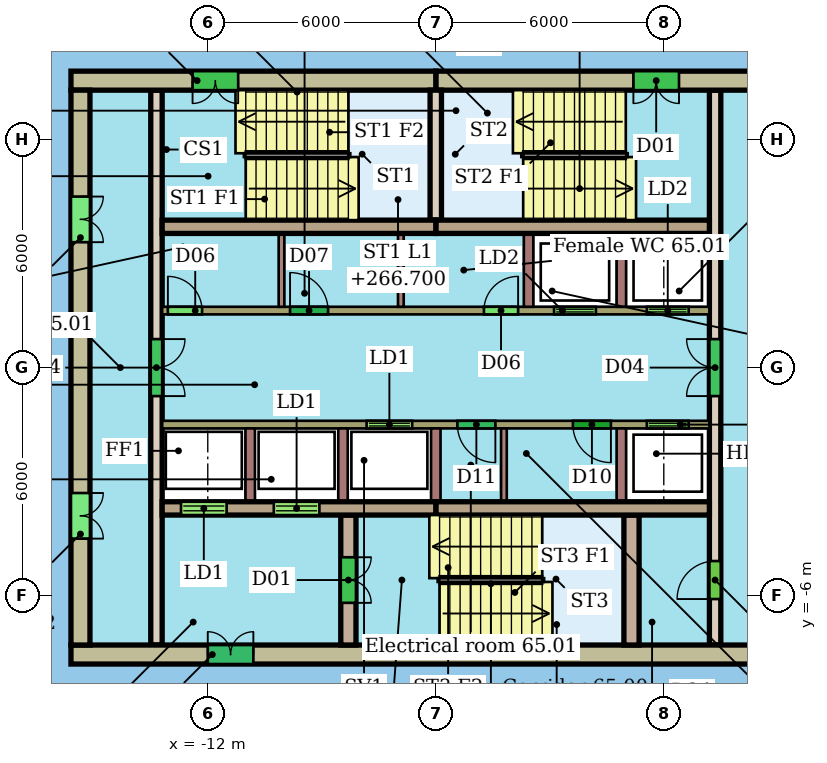
"""IFC4 building model, lengths in metres.
Left out: names, types, materials, properties, quantities, classifications, styles, units other than length and angle.
Written with IfcOpenShell. Run it as: python <this file> out.ifc"""

import sys

from ifc_helpers import new_model, si_unit, direction, frame, frame_2d, origin, place, context, subcontext, project, spatial, rectangle, extrude, element, fill, save


model = new_model("IFC4")
c1 = context("Model", 3, precision=1e-05, world=origin(), true_north=direction((0.0, 1.0)))
c2 = subcontext(c1, "Body", "Model", "MODEL_VIEW")
j1 = project(units=[si_unit("LENGTHUNIT", "METRE"), si_unit("PLANEANGLEUNIT", "RADIAN")], contexts=[c1])
p1 = place(None, origin())
s1 = spatial("IfcSite", under=j1, at=p1, CompositionType="ELEMENT")
p2 = place(p1, origin())
s2 = spatial("IfcBuilding", under=s1, at=p2, CompositionType="ELEMENT")
p3 = place(p2, frame((0.0, 0.0, 264.9)))
s3 = spatial("IfcBuildingStorey", under=s2, at=p3, CompositionType="ELEMENT", Elevation=264.9)
p4 = place(p3, frame((3.6, 7.55, 0.0), z_axis=(0.0, 0.0, 1.0), x_axis=(-1.0, 0.0, 0.0)))
e1 = element("IfcWall", 1, at=p4, inside=s3, PredefinedType="SHEAR", context=c2, shape_type="SweptSolid", body=[
    extrude(rectangle(XDim=9.6, YDim=0.5, at=frame_2d((4.8, 0.0))), origin(), (0.0, 0.0, 1.0), 3.3),
])
p5 = place(p4, frame((3.2, 0.0, 0.0)))
e2 = element("IfcOpeningElement", 2, at=p5, cuts=e1, PredefinedType="OPENING", context=c2, shape_type="SweptSolid", body=[
    extrude(rectangle(XDim=1.2, YDim=2.1, at=frame_2d((0.6, 1.05))), frame((0.0, 0.26, 0.0), z_axis=(0.0, -1.0, 0.0), x_axis=(1.0, 0.0, 0.0)), (0.0, 0.0, 1.0), 0.52),
])
p6 = place(p3, frame((-6.0, 7.55, 0.0), z_axis=(0.0, 0.0, 1.0), x_axis=(-1.0, 0.0, 0.0)))
e3 = element("IfcWall", 3, at=p6, inside=s3, PredefinedType="SHEAR", context=c2, shape_type="SweptSolid", body=[
    extrude(rectangle(XDim=9.6, YDim=0.5, at=frame_2d((4.8, 0.0))), origin(), (0.0, 0.0, 1.0), 3.3),
])
p7 = place(p6, frame((5.2, 0.0, 0.0)))
e4 = element("IfcOpeningElement", 4, at=p7, cuts=e3, PredefinedType="OPENING", context=c2, shape_type="SweptSolid", body=[
    extrude(rectangle(XDim=1.2, YDim=2.1, at=frame_2d((0.6, 1.05))), frame((0.0, 0.26, 0.0), z_axis=(0.0, -1.0, 0.0), x_axis=(1.0, 0.0, 0.0)), (0.0, 0.0, 1.0), 0.52),
])
p8 = place(p3, frame((-15.6, -7.55, 0.0), z_axis=(0.0, 0.0, 1.0), x_axis=(1.0, 0.0, 0.0)))
e5 = element("IfcWall", 5, at=p8, inside=s3, PredefinedType="SHEAR", context=c2, shape_type="SweptSolid", body=[
    extrude(rectangle(XDim=19.2, YDim=0.5, at=frame_2d((9.6, 0.0))), origin(), (0.0, 0.0, 1.0), 3.3),
])
p9 = place(p8, frame((3.6, 0.0, 0.0)))
e6 = element("IfcOpeningElement", 6, at=p9, cuts=e5, PredefinedType="OPENING", context=c2, shape_type="SweptSolid", body=[
    extrude(rectangle(XDim=1.2, YDim=2.1, at=frame_2d((0.6, 1.05))), frame((0.0, 0.26, 0.0), z_axis=(0.0, -1.0, 0.0), x_axis=(1.0, 0.0, 0.0)), (0.0, 0.0, 1.0), 0.52),
])
p10 = place(p3, frame((-15.35, 7.3, 0.0), z_axis=(0.0, 0.0, 1.0), x_axis=(0.0, -1.0, 0.0)))
e7 = element("IfcWall", 7, at=p10, inside=s3, PredefinedType="SHEAR", context=c2, shape_type="SweptSolid", body=[
    extrude(rectangle(XDim=14.6, YDim=0.5, at=frame_2d((7.3, 0.0))), origin(), (0.0, 0.0, 1.0), 3.3),
])
p11 = place(p10, frame((10.6, 0.0, 0.0)))
e8 = element("IfcOpeningElement", 8, at=p11, cuts=e7, PredefinedType="OPENING", context=c2, shape_type="SweptSolid", body=[
    extrude(rectangle(XDim=1.2, YDim=2.1, at=frame_2d((0.6, 1.05))), frame((0.0, 0.26, 0.0), z_axis=(0.0, -1.0, 0.0), x_axis=(1.0, 0.0, 0.0)), (0.0, 0.0, 1.0), 0.52),
])
p12 = place(p10, frame((2.8, 0.0, 0.0)))
e9 = element("IfcOpeningElement", 9, at=p12, cuts=e7, PredefinedType="OPENING", context=c2, shape_type="SweptSolid", body=[
    extrude(rectangle(XDim=1.2, YDim=2.1, at=frame_2d((0.6, 1.05))), frame((0.0, 0.26, 0.0), z_axis=(0.0, -1.0, 0.0), x_axis=(1.0, 0.0, 0.0)), (0.0, 0.0, 1.0), 0.52),
])
for number, where, z_axis, x_axis in (
    (10, (-13.2, 3.705, 0.0), (0.0, 0.0, 1.0), (1.0, 0.0, 0.0)),
    (11, (-6.0, 3.705, 0.0), (0.0, 0.0, 1.0), (1.0, 0.0, 0.0)),
):
    element("IfcWall", number, at=place(p3, frame(where, z_axis=z_axis, x_axis=x_axis)), inside=s3, PredefinedType="SHEAR", context=c2, shape_type="SweptSolid", body=[
        extrude(rectangle(XDim=7.2, YDim=0.35, at=frame_2d((3.6, 0.0))), origin(), (0.0, 0.0, 1.0), 3.3),
    ])
p13 = place(p3, frame((-13.2, -3.705, 0.0), z_axis=(0.0, 0.0, 1.0), x_axis=(1.0, 0.0, 0.0)))
e12 = element("IfcWall", 12, at=p13, inside=s3, PredefinedType="SHEAR", context=c2, shape_type="SweptSolid", body=[
    extrude(rectangle(XDim=7.2, YDim=0.35, at=frame_2d((3.6, 0.0))), origin(), (0.0, 0.0, 1.0), 3.3),
])
p14 = place(p13, frame((0.496, 0.0, 0.0)))
e13 = element("IfcOpeningElement", 13, at=p14, cuts=e12, PredefinedType="OPENING", context=c2, shape_type="SweptSolid", body=[
    extrude(rectangle(XDim=1.2, YDim=2.1, at=frame_2d((0.6, 1.05))), frame((0.0, 0.185, 0.0), z_axis=(0.0, -1.0, 0.0), x_axis=(1.0, 0.0, 0.0)), (0.0, 0.0, 1.0), 0.37),
])
p15 = place(p13, frame((2.938, 0.0, 0.0)))
e14 = element("IfcOpeningElement", 14, at=p15, cuts=e12, PredefinedType="OPENING", context=c2, shape_type="SweptSolid", body=[
    extrude(rectangle(XDim=1.2, YDim=2.1, at=frame_2d((0.6, 1.05))), frame((0.0, 0.185, 0.0), z_axis=(0.0, -1.0, 0.0), x_axis=(1.0, 0.0, 0.0)), (0.0, 0.0, 1.0), 0.37),
])
p16 = place(p3, frame((-6.0, -3.705, 0.0), z_axis=(0.0, 0.0, 1.0), x_axis=(1.0, 0.0, 0.0)))
e15 = element("IfcWall", 15, at=p16, inside=s3, PredefinedType="SHEAR", context=c2, shape_type="SweptSolid", body=[
    extrude(rectangle(XDim=7.2, YDim=0.35, at=frame_2d((3.6, 0.0))), origin(), (0.0, 0.0, 1.0), 3.3),
])
p17 = place(p3, frame((-13.35, 7.3, 0.0), z_axis=(0.0, 0.0, 1.0), x_axis=(0.0, -1.0, 0.0)))
e16 = element("IfcWall", 16, at=p17, inside=s3, PredefinedType="SHEAR", context=c2, shape_type="SweptSolid", body=[
    extrude(rectangle(XDim=14.6, YDim=0.3, at=frame_2d((7.3, 0.0))), origin(), (0.0, 0.0, 1.0), 3.3),
])
p18 = place(p17, frame((6.55, 0.0, 0.0)))
e17 = element("IfcOpeningElement", 17, at=p18, cuts=e16, PredefinedType="OPENING", context=c2, shape_type="SweptSolid", body=[
    extrude(rectangle(XDim=1.5, YDim=2.1, at=frame_2d((0.75, 1.05))), frame((0.0, 0.16, 0.0), z_axis=(0.0, -1.0, 0.0), x_axis=(1.0, 0.0, 0.0)), (0.0, 0.0, 1.0), 0.32),
])
p19 = place(p3, frame((1.35, -7.3, 0.0), z_axis=(0.0, 0.0, 1.0), x_axis=(0.0, 1.0, 0.0)))
e18 = element("IfcWall", 18, at=p19, inside=s3, PredefinedType="SHEAR", context=c2, shape_type="SweptSolid", body=[
    extrude(rectangle(XDim=14.6, YDim=0.3, at=frame_2d((7.3, 0.0))), origin(), (0.0, 0.0, 1.0), 3.3),
])
p20 = place(p19, frame((1.21, 0.0, 0.0)))
e19 = element("IfcOpeningElement", 19, at=p20, cuts=e18, PredefinedType="OPENING", context=c2, shape_type="SweptSolid", body=[
    extrude(rectangle(XDim=1.0, YDim=2.1, at=frame_2d((0.5, 1.05))), frame((0.0, 0.16, 0.0), z_axis=(0.0, -1.0, 0.0), x_axis=(1.0, 0.0, 0.0)), (0.0, 0.0, 1.0), 0.32),
])
p21 = place(p19, frame((6.55, 0.0, 0.0)))
e20 = element("IfcOpeningElement", 20, at=p21, cuts=e18, PredefinedType="OPENING", context=c2, shape_type="SweptSolid", body=[
    extrude(rectangle(XDim=1.5, YDim=2.1, at=frame_2d((0.75, 1.05))), frame((0.0, 0.16, 0.0), z_axis=(0.0, -1.0, 0.0), x_axis=(1.0, 0.0, 0.0)), (0.0, 0.0, 1.0), 0.32),
])
p22 = place(p3, frame((-13.2, 1.5, 0.0), z_axis=(0.0, 0.0, 1.0), x_axis=(1.0, 0.0, 0.0)))
e21 = element("IfcWall", 21, at=p22, inside=s3, PredefinedType="SHEAR", context=c2, shape_type="SweptSolid", body=[
    extrude(rectangle(XDim=14.4, YDim=0.2, at=frame_2d((7.2, 0.0))), origin(), (0.0, 0.0, 1.0), 3.3),
])
p23 = place(p22, frame((10.312, 0.0, 0.0)))
e22 = element("IfcOpeningElement", 22, at=p23, cuts=e21, PredefinedType="OPENING", context=c2, shape_type="SweptSolid", body=[
    extrude(rectangle(XDim=1.1, YDim=2.1, at=frame_2d((0.55, 1.05))), frame((0.0, 0.11, 0.0), z_axis=(0.0, -1.0, 0.0), x_axis=(1.0, 0.0, 0.0)), (0.0, 0.0, 1.0), 0.22),
])
p24 = place(p22, frame((12.754, 0.0, 0.0)))
e23 = element("IfcOpeningElement", 23, at=p24, cuts=e21, PredefinedType="OPENING", context=c2, shape_type="SweptSolid", body=[
    extrude(rectangle(XDim=1.1, YDim=2.1, at=frame_2d((0.55, 1.05))), frame((0.0, 0.11, 0.0), z_axis=(0.0, -1.0, 0.0), x_axis=(1.0, 0.0, 0.0)), (0.0, 0.0, 1.0), 0.22),
])
p25 = place(p22, frame((0.15, 0.0, 0.0)))
e24 = element("IfcOpeningElement", 24, at=p25, cuts=e21, PredefinedType="OPENING", context=c2, shape_type="SweptSolid", body=[
    extrude(rectangle(XDim=0.9, YDim=2.1, at=frame_2d((0.45, 1.05))), frame((0.0, 0.11, 0.0), z_axis=(0.0, -1.0, 0.0), x_axis=(1.0, 0.0, 0.0)), (0.0, 0.0, 1.0), 0.22),
])
p26 = place(p22, frame((3.365, 0.0, 0.0)))
e25 = element("IfcOpeningElement", 25, at=p26, cuts=e21, PredefinedType="OPENING", context=c2, shape_type="SweptSolid", body=[
    extrude(rectangle(XDim=1.0, YDim=2.1, at=frame_2d((0.5, 1.05))), frame((0.0, 0.11, 0.0), z_axis=(0.0, -1.0, 0.0), x_axis=(1.0, 0.0, 0.0)), (0.0, 0.0, 1.0), 0.22),
])
p27 = place(p22, frame((8.467, 0.0, 0.0)))
e26 = element("IfcOpeningElement", 26, at=p27, cuts=e21, PredefinedType="OPENING", context=c2, shape_type="SweptSolid", body=[
    extrude(rectangle(XDim=0.9, YDim=2.1, at=frame_2d((0.45, 1.05))), frame((0.0, 0.11, 0.0), z_axis=(0.0, -1.0, 0.0), x_axis=(1.0, 0.0, 0.0)), (0.0, 0.0, 1.0), 0.22),
])
p28 = place(p3, frame((1.2, -1.5, 0.0), z_axis=(0.0, 0.0, 1.0), x_axis=(-1.0, 0.0, 0.0)))
e27 = element("IfcWall", 27, at=p28, inside=s3, PredefinedType="SHEAR", context=c2, shape_type="SweptSolid", body=[
    extrude(rectangle(XDim=14.4, YDim=0.2, at=frame_2d((7.2, 0.0))), origin(), (0.0, 0.0, 1.0), 3.3),
])
p29 = place(p28, frame((7.821, 0.0, 0.0)))
e28 = element("IfcOpeningElement", 28, at=p29, cuts=e27, PredefinedType="OPENING", context=c2, shape_type="SweptSolid", body=[
    extrude(rectangle(XDim=1.2, YDim=2.1, at=frame_2d((0.6, 1.05))), frame((0.0, 0.11, 0.0), z_axis=(0.0, -1.0, 0.0), x_axis=(1.0, 0.0, 0.0)), (0.0, 0.0, 1.0), 0.22),
])
p30 = place(p28, frame((0.546, 0.0, 0.0)))
e29 = element("IfcOpeningElement", 29, at=p30, cuts=e27, PredefinedType="OPENING", context=c2, shape_type="SweptSolid", body=[
    extrude(rectangle(XDim=1.1, YDim=2.1, at=frame_2d((0.55, 1.05))), frame((0.0, 0.11, 0.0), z_axis=(0.0, -1.0, 0.0), x_axis=(1.0, 0.0, 0.0)), (0.0, 0.0, 1.0), 0.22),
])
p31 = place(p28, frame((5.632, 0.0, 0.0)))
e30 = element("IfcOpeningElement", 30, at=p31, cuts=e27, PredefinedType="OPENING", context=c2, shape_type="SweptSolid", body=[
    extrude(rectangle(XDim=1.0, YDim=2.1, at=frame_2d((0.5, 1.05))), frame((0.0, 0.11, 0.0), z_axis=(0.0, -1.0, 0.0), x_axis=(1.0, 0.0, 0.0)), (0.0, 0.0, 1.0), 0.22),
])
p32 = place(p28, frame((2.592, 0.0, 0.0)))
e31 = element("IfcOpeningElement", 31, at=p32, cuts=e27, PredefinedType="OPENING", context=c2, shape_type="SweptSolid", body=[
    extrude(rectangle(XDim=1.0, YDim=2.1, at=frame_2d((0.5, 1.05))), frame((0.0, 0.11, 0.0), z_axis=(0.0, -1.0, 0.0), x_axis=(1.0, 0.0, 0.0)), (0.0, 0.0, 1.0), 0.22),
])
p33 = place(p3, frame((-8.3, -3.88, 0.0), z_axis=(0.0, 0.0, 1.0), x_axis=(0.0, -1.0, 0.0)))
e32 = element("IfcWall", 32, at=p33, inside=s3, PredefinedType="SHEAR", context=c2, shape_type="SweptSolid", body=[
    extrude(rectangle(XDim=3.42, YDim=0.4, at=frame_2d((1.71, 0.0))), origin(), (0.0, 0.0, 1.0), 3.3),
])
p34 = place(p33, frame((1.11, 0.0, 0.0)))
e33 = element("IfcOpeningElement", 33, at=p34, cuts=e32, PredefinedType="OPENING", context=c2, shape_type="SweptSolid", body=[
    extrude(rectangle(XDim=1.2, YDim=2.1, at=frame_2d((0.6, 1.05))), frame((0.0, 0.21, 0.0), z_axis=(0.0, -1.0, 0.0), x_axis=(1.0, 0.0, 0.0)), (0.0, 0.0, 1.0), 0.42),
])
p35 = place(p3, frame((-0.85, -3.88, 0.0), z_axis=(0.0, 0.0, 1.0), x_axis=(0.0, -1.0, 0.0)))
e34 = element("IfcWall", 34, at=p35, inside=s3, PredefinedType="SHEAR", context=c2, shape_type="SweptSolid", body=[
    extrude(rectangle(XDim=3.42, YDim=0.4, at=frame_2d((1.71, 0.0))), origin(), (0.0, 0.0, 1.0), 3.3),
])
p36 = place(p3, frame((-6.0, 3.88, 0.0), z_axis=(0.0, 0.0, 1.0), x_axis=(0.0, 1.0, 0.0)))
e35 = element("IfcWall", 35, at=p36, inside=s3, PredefinedType="SHEAR", context=c2, shape_type="SweptSolid", body=[
    extrude(rectangle(XDim=3.42, YDim=0.3, at=frame_2d((1.71, 0.0))), origin(), (0.0, 0.0, 1.0), 3.3),
])
for number, where, z_axis, x_axis in (
    (36, (-3.558, 1.6, 0.0), (0.0, 0.0, 1.0), (0.0, 1.0, 0.0)),
    (37, (-1.117, 1.6, 0.0), (0.0, 0.0, 1.0), (0.0, 1.0, 0.0)),
):
    element("IfcWall", number, at=place(p3, frame(where, z_axis=z_axis, x_axis=x_axis)), inside=s3, PredefinedType="SHEAR", context=c2, shape_type="SweptSolid", body=[
        extrude(rectangle(XDim=1.93, YDim=0.25, at=frame_2d((0.965, 0.0))), origin(), (0.0, 0.0, 1.0), 3.3),
    ])
for number, where, z_axis, x_axis in (
    (38, (-10.06, 1.6, 0.0), (0.0, 0.0, 1.0), (0.0, 1.0, 0.0)),
    (39, (-6.919, 1.6, 0.0), (0.0, 0.0, 1.0), (0.0, 1.0, 0.0)),
):
    element("IfcWall", number, at=place(p3, frame(where, z_axis=z_axis, x_axis=x_axis)), inside=s3, PredefinedType="PARTITIONING", context=c2, shape_type="SweptSolid", body=[
        extrude(rectangle(XDim=1.93, YDim=0.15, at=frame_2d((0.965, 0.0))), origin(), (0.0, 0.0, 1.0), 3.3),
    ])
for number, where, z_axis, x_axis in (
    (40, (-10.883, -1.6, 0.0), (0.0, 0.0, 1.0), (0.0, -1.0, 0.0)),
    (41, (-8.442, -1.6, 0.0), (0.0, 0.0, 1.0), (0.0, -1.0, 0.0)),
    (42, (-6.0, -1.6, 0.0), (0.0, 0.0, 1.0), (0.0, -1.0, 0.0)),
    (43, (-1.117, -1.6, 0.0), (0.0, 0.0, 1.0), (0.0, -1.0, 0.0)),
):
    element("IfcWall", number, at=place(p3, frame(where, z_axis=z_axis, x_axis=x_axis)), inside=s3, PredefinedType="SHEAR", context=c2, shape_type="SweptSolid", body=[
        extrude(rectangle(XDim=1.93, YDim=0.25, at=frame_2d((0.965, 0.0))), origin(), (0.0, 0.0, 1.0), 3.3),
    ])
p37 = place(p3, frame((-4.207, -1.6, 0.0), z_axis=(0.0, 0.0, 1.0), x_axis=(0.0, -1.0, 0.0)))
e44 = element("IfcWall", 44, at=p37, inside=s3, PredefinedType="PARTITIONING", context=c2, shape_type="SweptSolid", body=[
    extrude(rectangle(XDim=1.93, YDim=0.15, at=frame_2d((0.965, 0.0))), origin(), (0.0, 0.0, 1.0), 3.3),
])
p38 = place(p5, origin())
e45 = element("IfcDoor", 45, at=p38, inside=s3, OperationType="DOUBLE_DOOR_SINGLE_SWING", PredefinedType="NOTDEFINED", context=c2, shape_type="SweptSolid", body=[
    extrude(rectangle(XDim=1.2, YDim=2.1, at=frame_2d((0.6, 1.05))), frame((0.0, 0.025, 0.0), z_axis=(0.0, -1.0, 0.0), x_axis=(1.0, 0.0, 0.0)), (0.0, 0.0, 1.0), 0.05),
])
fill(e2, e45)
p39 = place(p7, origin())
e46 = element("IfcDoor", 46, at=p39, inside=s3, OperationType="DOUBLE_DOOR_SINGLE_SWING", PredefinedType="NOTDEFINED", context=c2, shape_type="SweptSolid", body=[
    extrude(rectangle(XDim=1.2, YDim=2.1, at=frame_2d((0.6, 1.05))), frame((0.0, 0.025, 0.0), z_axis=(0.0, -1.0, 0.0), x_axis=(1.0, 0.0, 0.0)), (0.0, 0.0, 1.0), 0.05),
])
fill(e4, e46)
p40 = place(p9, origin())
e47 = element("IfcDoor", 47, at=p40, inside=s3, OperationType="DOUBLE_DOOR_SINGLE_SWING", PredefinedType="NOTDEFINED", context=c2, shape_type="SweptSolid", body=[
    extrude(rectangle(XDim=1.2, YDim=2.1, at=frame_2d((0.6, 1.05))), frame((0.0, 0.025, 0.0), z_axis=(0.0, -1.0, 0.0), x_axis=(1.0, 0.0, 0.0)), (0.0, 0.0, 1.0), 0.05),
])
fill(e6, e47)
p41 = place(p11, origin())
e48 = element("IfcDoor", 48, at=p41, inside=s3, OperationType="DOUBLE_DOOR_SINGLE_SWING", PredefinedType="NOTDEFINED", context=c2, shape_type="SweptSolid", body=[
    extrude(rectangle(XDim=1.2, YDim=2.1, at=frame_2d((0.6, 1.05))), frame((0.0, 0.025, 0.0), z_axis=(0.0, -1.0, 0.0), x_axis=(1.0, 0.0, 0.0)), (0.0, 0.0, 1.0), 0.05),
])
fill(e8, e48)
p42 = place(p12, origin())
e49 = element("IfcDoor", 49, at=p42, inside=s3, OperationType="DOUBLE_DOOR_SINGLE_SWING", PredefinedType="NOTDEFINED", context=c2, shape_type="SweptSolid", body=[
    extrude(rectangle(XDim=1.2, YDim=2.1, at=frame_2d((0.6, 1.05))), frame((0.0, 0.025, 0.0), z_axis=(0.0, -1.0, 0.0), x_axis=(1.0, 0.0, 0.0)), (0.0, 0.0, 1.0), 0.05),
])
fill(e9, e49)
p43 = place(p14, origin())
e50 = element("IfcDoor", 50, at=p43, inside=s3, OperationType="DOUBLE_DOOR_SLIDING", PredefinedType="NOTDEFINED", context=c2, shape_type="SweptSolid", body=[
    extrude(rectangle(XDim=1.2, YDim=2.1, at=frame_2d((0.6, 1.05))), frame((0.0, 0.025, 0.0), z_axis=(0.0, -1.0, 0.0), x_axis=(1.0, 0.0, 0.0)), (0.0, 0.0, 1.0), 0.05),
])
fill(e13, e50)
p44 = place(p15, origin())
e51 = element("IfcDoor", 51, at=p44, inside=s3, OperationType="DOUBLE_DOOR_SLIDING", PredefinedType="NOTDEFINED", context=c2, shape_type="SweptSolid", body=[
    extrude(rectangle(XDim=1.2, YDim=2.1, at=frame_2d((0.6, 1.05))), frame((0.0, 0.025, 0.0), z_axis=(0.0, -1.0, 0.0), x_axis=(1.0, 0.0, 0.0)), (0.0, 0.0, 1.0), 0.05),
])
fill(e14, e51)
p45 = place(p18, origin())
e52 = element("IfcDoor", 52, at=p45, inside=s3, OperationType="DOUBLE_DOOR_SINGLE_SWING", PredefinedType="NOTDEFINED", context=c2, shape_type="SweptSolid", body=[
    extrude(rectangle(XDim=1.5, YDim=2.1, at=frame_2d((0.75, 1.05))), frame((0.0, 0.025, 0.0), z_axis=(0.0, -1.0, 0.0), x_axis=(1.0, 0.0, 0.0)), (0.0, 0.0, 1.0), 0.05),
])
fill(e17, e52)
p46 = place(p20, origin())
e53 = element("IfcDoor", 53, at=p46, inside=s3, OperationType="SINGLE_SWING_LEFT", PredefinedType="NOTDEFINED", context=c2, shape_type="SweptSolid", body=[
    extrude(rectangle(XDim=1.0, YDim=2.1, at=frame_2d((0.5, 1.05))), frame((0.0, 0.025, 0.0), z_axis=(0.0, -1.0, 0.0), x_axis=(1.0, 0.0, 0.0)), (0.0, 0.0, 1.0), 0.05),
])
fill(e19, e53)
p47 = place(p21, origin())
e54 = element("IfcDoor", 54, at=p47, inside=s3, OperationType="DOUBLE_DOOR_SINGLE_SWING", PredefinedType="NOTDEFINED", context=c2, shape_type="SweptSolid", body=[
    extrude(rectangle(XDim=1.5, YDim=2.1, at=frame_2d((0.75, 1.05))), frame((0.0, 0.025, 0.0), z_axis=(0.0, -1.0, 0.0), x_axis=(1.0, 0.0, 0.0)), (0.0, 0.0, 1.0), 0.05),
])
fill(e20, e54)
p48 = place(p23, origin())
e55 = element("IfcDoor", 55, at=p48, inside=s3, OperationType="DOUBLE_DOOR_SLIDING", PredefinedType="NOTDEFINED", context=c2, shape_type="SweptSolid", body=[
    extrude(rectangle(XDim=1.1, YDim=2.1, at=frame_2d((0.55, 1.05))), frame((0.0, 0.025, 0.0), z_axis=(0.0, -1.0, 0.0), x_axis=(1.0, 0.0, 0.0)), (0.0, 0.0, 1.0), 0.05),
])
fill(e22, e55)
p49 = place(p24, origin())
e56 = element("IfcDoor", 56, at=p49, inside=s3, OperationType="DOUBLE_DOOR_SLIDING", PredefinedType="NOTDEFINED", context=c2, shape_type="SweptSolid", body=[
    extrude(rectangle(XDim=1.1, YDim=2.1, at=frame_2d((0.55, 1.05))), frame((0.0, 0.025, 0.0), z_axis=(0.0, -1.0, 0.0), x_axis=(1.0, 0.0, 0.0)), (0.0, 0.0, 1.0), 0.05),
])
fill(e23, e56)
p50 = place(p25, origin())
e57 = element("IfcDoor", 57, at=p50, inside=s3, OperationType="SINGLE_SWING_LEFT", PredefinedType="NOTDEFINED", context=c2, shape_type="SweptSolid", body=[
    extrude(rectangle(XDim=0.9, YDim=2.1, at=frame_2d((0.45, 1.05))), frame((0.0, 0.025, 0.0), z_axis=(0.0, -1.0, 0.0), x_axis=(1.0, 0.0, 0.0)), (0.0, 0.0, 1.0), 0.05),
])
fill(e24, e57)
p51 = place(p26, origin())
e58 = element("IfcDoor", 58, at=p51, inside=s3, OperationType="SINGLE_SWING_LEFT", PredefinedType="NOTDEFINED", context=c2, shape_type="SweptSolid", body=[
    extrude(rectangle(XDim=1.0, YDim=2.1, at=frame_2d((0.5, 1.05))), frame((0.0, 0.025, 0.0), z_axis=(0.0, -1.0, 0.0), x_axis=(1.0, 0.0, 0.0)), (0.0, 0.0, 1.0), 0.05),
])
fill(e25, e58)
p52 = place(p27, origin())
e59 = element("IfcDoor", 59, at=p52, inside=s3, OperationType="SINGLE_SWING_RIGHT", PredefinedType="NOTDEFINED", context=c2, shape_type="SweptSolid", body=[
    extrude(rectangle(XDim=0.9, YDim=2.1, at=frame_2d((0.45, 1.05))), frame((0.0, 0.025, 0.0), z_axis=(0.0, -1.0, 0.0), x_axis=(1.0, 0.0, 0.0)), (0.0, 0.0, 1.0), 0.05),
])
fill(e26, e59)
p53 = place(p29, origin())
e60 = element("IfcDoor", 60, at=p53, inside=s3, OperationType="DOUBLE_DOOR_SLIDING", PredefinedType="NOTDEFINED", context=c2, shape_type="SweptSolid", body=[
    extrude(rectangle(XDim=1.2, YDim=2.1, at=frame_2d((0.6, 1.05))), frame((0.0, 0.025, 0.0), z_axis=(0.0, -1.0, 0.0), x_axis=(1.0, 0.0, 0.0)), (0.0, 0.0, 1.0), 0.05),
])
fill(e28, e60)
p54 = place(p30, origin())
e61 = element("IfcDoor", 61, at=p54, inside=s3, OperationType="DOUBLE_DOOR_SLIDING", PredefinedType="NOTDEFINED", context=c2, shape_type="SweptSolid", body=[
    extrude(rectangle(XDim=1.1, YDim=2.1, at=frame_2d((0.55, 1.05))), frame((0.0, 0.025, 0.0), z_axis=(0.0, -1.0, 0.0), x_axis=(1.0, 0.0, 0.0)), (0.0, 0.0, 1.0), 0.05),
])
fill(e29, e61)
p55 = place(p31, origin())
e62 = element("IfcDoor", 62, at=p55, inside=s3, OperationType="SINGLE_SWING_LEFT", PredefinedType="NOTDEFINED", context=c2, shape_type="SweptSolid", body=[
    extrude(rectangle(XDim=1.0, YDim=2.1, at=frame_2d((0.5, 1.05))), frame((0.0, 0.025, 0.0), z_axis=(0.0, -1.0, 0.0), x_axis=(1.0, 0.0, 0.0)), (0.0, 0.0, 1.0), 0.05),
])
fill(e30, e62)
p56 = place(p32, origin())
e63 = element("IfcDoor", 63, at=p56, inside=s3, OperationType="SINGLE_SWING_LEFT", PredefinedType="NOTDEFINED", context=c2, shape_type="SweptSolid", body=[
    extrude(rectangle(XDim=1.0, YDim=2.1, at=frame_2d((0.5, 1.05))), frame((0.0, 0.025, 0.0), z_axis=(0.0, -1.0, 0.0), x_axis=(1.0, 0.0, 0.0)), (0.0, 0.0, 1.0), 0.05),
])
fill(e31, e63)
p57 = place(p34, origin())
e64 = element("IfcDoor", 64, at=p57, inside=s3, OperationType="DOUBLE_DOOR_SINGLE_SWING", PredefinedType="NOTDEFINED", context=c2, shape_type="SweptSolid", body=[
    extrude(rectangle(XDim=1.2, YDim=2.1, at=frame_2d((0.6, 1.05))), frame((0.0, 0.025, 0.0), z_axis=(0.0, -1.0, 0.0), x_axis=(1.0, 0.0, 0.0)), (0.0, 0.0, 1.0), 0.05),
])
fill(e33, e64)
save(model, sys.argv[1])
